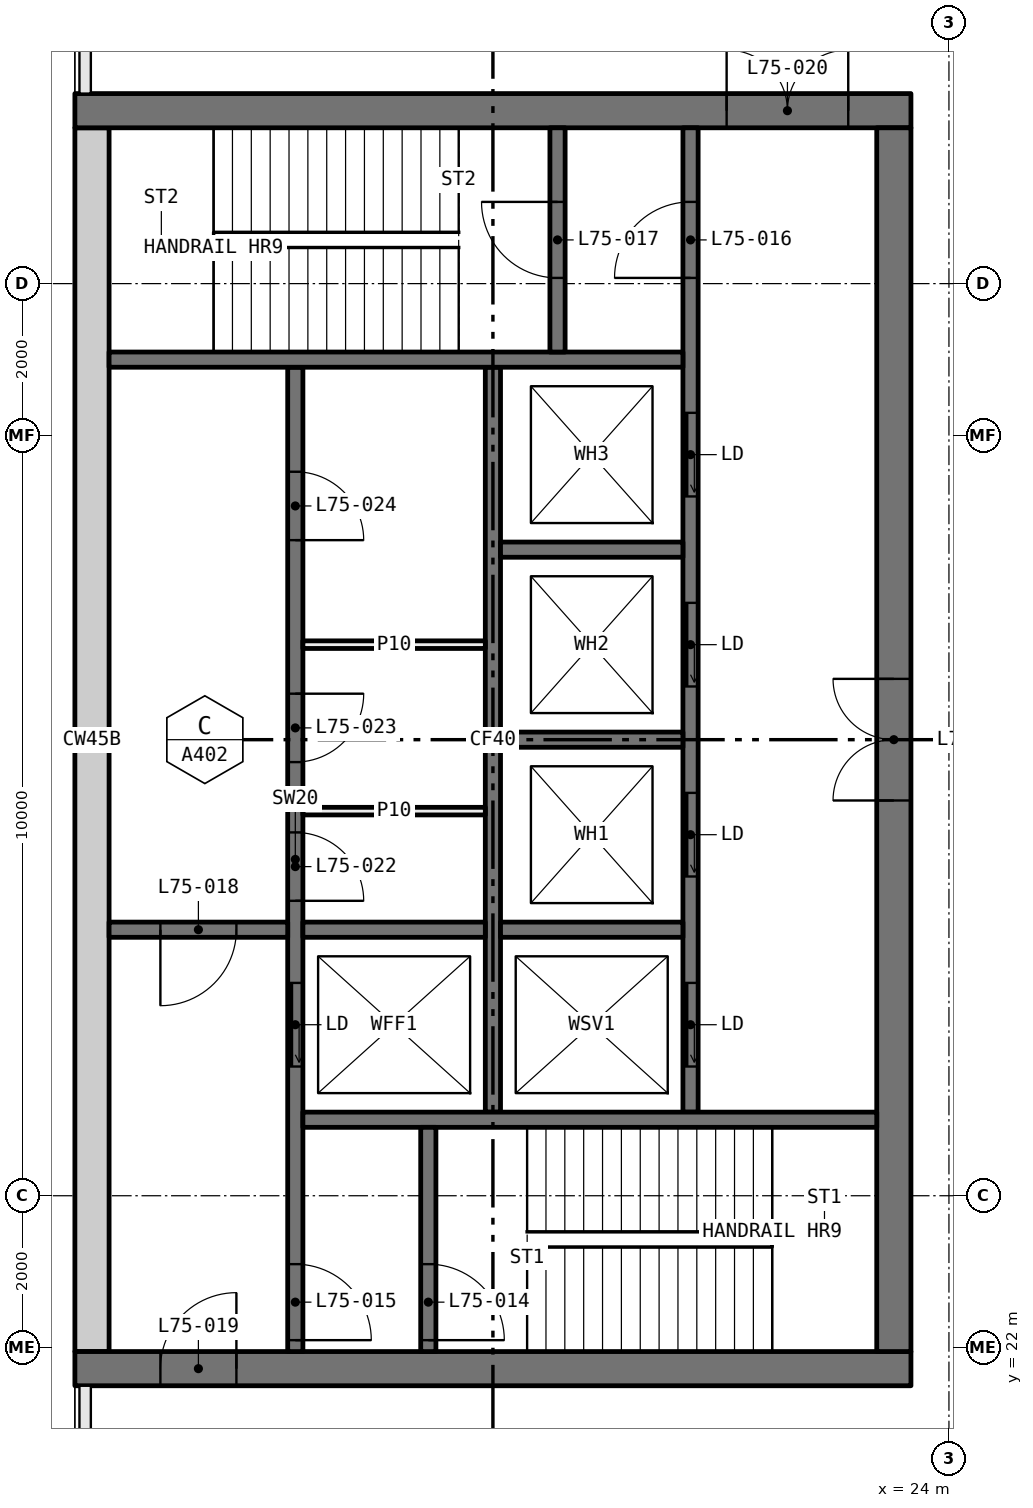
"""IFC4 building model, lengths in metres.
Left out: names, types, materials, properties, quantities, classifications, styles, units other than length and angle.
Written with IfcOpenShell. Run it as: python <this file> out.ifc"""

import sys

from ifc_helpers import new_model, si_unit, direction, frame, frame_2d, origin, place, context, subcontext, project, spatial, rectangle, extrude, element, fill, save


model = new_model("IFC4")
c1 = context("Model", 3, precision=1e-05, world=origin(), true_north=direction((0.0, 1.0)))
c2 = subcontext(c1, "Body", "Model", "MODEL_VIEW")
j1 = project(units=[si_unit("LENGTHUNIT", "METRE"), si_unit("PLANEANGLEUNIT", "RADIAN")], contexts=[c1])
p1 = place(None, origin())
s1 = spatial("IfcSite", under=j1, at=p1, CompositionType="ELEMENT")
p2 = place(p1, origin())
s2 = spatial("IfcBuilding", under=s1, at=p2, CompositionType="ELEMENT")
p3 = place(p2, frame((0.0, 0.0, 277.95)))
s3 = spatial("IfcBuildingStorey", under=s2, at=p3, CompositionType="ELEMENT", Elevation=277.95)
p4 = place(p3, frame((12.5, 21.725, 0.0), z_axis=(0.0, 0.0, 1.0), x_axis=(1.0, 0.0, 0.0)))
e1 = element("IfcWall", 1, at=p4, inside=s3, PredefinedType="SHEAR", context=c2, shape_type="SweptSolid", body=[
    extrude(rectangle(XDim=11.0, YDim=0.45, at=frame_2d((5.5, 0.0))), origin(), (0.0, 0.0, 1.0), 5.0),
])
p5 = place(p4, frame((1.125, 0.0, 0.0)))
e2 = element("IfcOpeningElement", 2, at=p5, cuts=e1, PredefinedType="OPENING", context=c2, shape_type="SweptSolid", body=[
    extrude(rectangle(XDim=1.0, YDim=2.1, at=frame_2d((0.5, 1.05))), frame((0.0, 0.235, 0.0), z_axis=(0.0, -1.0, 0.0), x_axis=(1.0, 0.0, 0.0)), (0.0, 0.0, 1.0), 0.47),
])
p6 = place(p3, frame((12.5, 38.275, 0.0), z_axis=(0.0, 0.0, 1.0), x_axis=(1.0, 0.0, 0.0)))
e3 = element("IfcWall", 3, at=p6, inside=s3, PredefinedType="SHEAR", context=c2, shape_type="SweptSolid", body=[
    extrude(rectangle(XDim=11.0, YDim=0.45, at=frame_2d((5.5, 0.0))), origin(), (0.0, 0.0, 1.0), 5.0),
])
p7 = place(p6, frame((8.575, 0.0, 0.0)))
e4 = element("IfcOpeningElement", 4, at=p7, cuts=e3, PredefinedType="OPENING", context=c2, shape_type="SweptSolid", body=[
    extrude(rectangle(XDim=1.6, YDim=2.1, at=frame_2d((0.8, 1.05))), frame((0.0, 0.235, 0.0), z_axis=(0.0, -1.0, 0.0), x_axis=(1.0, 0.0, 0.0)), (0.0, 0.0, 1.0), 0.47),
])
p8 = place(p3, frame((12.725, 21.95, 0.0), z_axis=(0.0, 0.0, 1.0), x_axis=(0.0, 1.0, 0.0)))
e5 = element("IfcWall", 5, at=p8, inside=s3, PredefinedType="SHEAR", context=c2, shape_type="SweptSolid", body=[
    extrude(rectangle(XDim=16.1, YDim=0.45, at=frame_2d((8.05, 0.0))), origin(), (0.0, 0.0, 1.0), 5.0),
])
p9 = place(p3, frame((23.275, 21.95, 0.0), z_axis=(0.0, 0.0, 1.0), x_axis=(0.0, 1.0, 0.0)))
e6 = element("IfcWall", 6, at=p9, inside=s3, PredefinedType="SHEAR", context=c2, shape_type="SweptSolid", body=[
    extrude(rectangle(XDim=16.1, YDim=0.45, at=frame_2d((8.05, 0.0))), origin(), (0.0, 0.0, 1.0), 5.0),
])
p10 = place(p9, frame((7.25, 0.0, 0.0)))
e7 = element("IfcOpeningElement", 7, at=p10, cuts=e6, PredefinedType="OPENING", context=c2, shape_type="SweptSolid", body=[
    extrude(rectangle(XDim=1.6, YDim=2.1, at=frame_2d((0.8, 1.05))), frame((0.0, 0.235, 0.0), z_axis=(0.0, -1.0, 0.0), x_axis=(1.0, 0.0, 0.0)), (0.0, 0.0, 1.0), 0.47),
])
p11 = place(p3, frame((15.4, 21.95, 0.0), z_axis=(0.0, 0.0, 1.0), x_axis=(0.0, 1.0, 0.0)))
e8 = element("IfcWall", 8, at=p11, inside=s3, PredefinedType="SOLIDWALL", context=c2, shape_type="SweptSolid", body=[
    extrude(rectangle(XDim=12.95, YDim=0.2, at=frame_2d((6.475, 0.0))), origin(), (0.0, 0.0, 1.0), 5.0),
])
p12 = place(p11, frame((3.75, 0.0, 0.0)))
e9 = element("IfcOpeningElement", 9, at=p12, cuts=e8, PredefinedType="OPENING", context=c2, shape_type="SweptSolid", body=[
    extrude(rectangle(XDim=1.1, YDim=2.1, at=frame_2d((0.55, 1.05))), frame((0.0, 0.11, 0.0), z_axis=(0.0, -1.0, 0.0), x_axis=(1.0, 0.0, 0.0)), (0.0, 0.0, 1.0), 0.22),
])
p13 = place(p11, frame((0.15, 0.0, 0.0)))
e10 = element("IfcOpeningElement", 10, at=p13, cuts=e8, PredefinedType="OPENING", context=c2, shape_type="SweptSolid", body=[
    extrude(rectangle(XDim=1.0, YDim=2.1, at=frame_2d((0.5, 1.05))), frame((0.0, 0.11, 0.0), z_axis=(0.0, -1.0, 0.0), x_axis=(1.0, 0.0, 0.0)), (0.0, 0.0, 1.0), 0.22),
])
p14 = place(p11, frame((5.93, 0.0, 0.0)))
e11 = element("IfcOpeningElement", 11, at=p14, cuts=e8, PredefinedType="OPENING", context=c2, shape_type="SweptSolid", body=[
    extrude(rectangle(XDim=0.9, YDim=2.1, at=frame_2d((0.45, 1.05))), frame((0.0, 0.11, 0.0), z_axis=(0.0, -1.0, 0.0), x_axis=(1.0, 0.0, 0.0)), (0.0, 0.0, 1.0), 0.22),
])
p15 = place(p11, frame((7.755, 0.0, 0.0)))
e12 = element("IfcOpeningElement", 12, at=p15, cuts=e8, PredefinedType="OPENING", context=c2, shape_type="SweptSolid", body=[
    extrude(rectangle(XDim=0.9, YDim=2.1, at=frame_2d((0.45, 1.05))), frame((0.0, 0.11, 0.0), z_axis=(0.0, -1.0, 0.0), x_axis=(1.0, 0.0, 0.0)), (0.0, 0.0, 1.0), 0.22),
])
p16 = place(p11, frame((10.675, 0.0, 0.0)))
e13 = element("IfcOpeningElement", 13, at=p16, cuts=e8, PredefinedType="OPENING", context=c2, shape_type="SweptSolid", body=[
    extrude(rectangle(XDim=0.9, YDim=2.1, at=frame_2d((0.45, 1.05))), frame((0.0, 0.11, 0.0), z_axis=(0.0, -1.0, 0.0), x_axis=(1.0, 0.0, 0.0)), (0.0, 0.0, 1.0), 0.22),
])
p17 = place(p3, frame((20.6, 25.1, 0.0), z_axis=(0.0, 0.0, 1.0), x_axis=(0.0, 1.0, 0.0)))
e14 = element("IfcWall", 14, at=p17, inside=s3, PredefinedType="SOLIDWALL", context=c2, shape_type="SweptSolid", body=[
    extrude(rectangle(XDim=12.95, YDim=0.2, at=frame_2d((6.475, 0.0))), origin(), (0.0, 0.0, 1.0), 5.0),
])
p18 = place(p17, frame((0.6, 0.0, 0.0)))
e15 = element("IfcOpeningElement", 15, at=p18, cuts=e14, PredefinedType="OPENING", context=c2, shape_type="SweptSolid", body=[
    extrude(rectangle(XDim=1.1, YDim=2.1, at=frame_2d((0.55, 1.05))), frame((0.0, 0.11, 0.0), z_axis=(0.0, -1.0, 0.0), x_axis=(1.0, 0.0, 0.0)), (0.0, 0.0, 1.0), 0.22),
])
p19 = place(p17, frame((3.1, 0.0, 0.0)))
e16 = element("IfcOpeningElement", 16, at=p19, cuts=e14, PredefinedType="OPENING", context=c2, shape_type="SweptSolid", body=[
    extrude(rectangle(XDim=1.1, YDim=2.1, at=frame_2d((0.55, 1.05))), frame((0.0, 0.11, 0.0), z_axis=(0.0, -1.0, 0.0), x_axis=(1.0, 0.0, 0.0)), (0.0, 0.0, 1.0), 0.22),
])
p20 = place(p17, frame((5.6, 0.0, 0.0)))
e17 = element("IfcOpeningElement", 17, at=p20, cuts=e14, PredefinedType="OPENING", context=c2, shape_type="SweptSolid", body=[
    extrude(rectangle(XDim=1.1, YDim=2.1, at=frame_2d((0.55, 1.05))), frame((0.0, 0.11, 0.0), z_axis=(0.0, -1.0, 0.0), x_axis=(1.0, 0.0, 0.0)), (0.0, 0.0, 1.0), 0.22),
])
p21 = place(p17, frame((8.1, 0.0, 0.0)))
e18 = element("IfcOpeningElement", 18, at=p21, cuts=e14, PredefinedType="OPENING", context=c2, shape_type="SweptSolid", body=[
    extrude(rectangle(XDim=1.1, YDim=2.1, at=frame_2d((0.55, 1.05))), frame((0.0, 0.11, 0.0), z_axis=(0.0, -1.0, 0.0), x_axis=(1.0, 0.0, 0.0)), (0.0, 0.0, 1.0), 0.22),
])
p22 = place(p17, frame((10.975, 0.0, 0.0)))
e19 = element("IfcOpeningElement", 19, at=p22, cuts=e14, PredefinedType="OPENING", context=c2, shape_type="SweptSolid", body=[
    extrude(rectangle(XDim=1.0, YDim=2.1, at=frame_2d((0.5, 1.05))), frame((0.0, 0.11, 0.0), z_axis=(0.0, -1.0, 0.0), x_axis=(1.0, 0.0, 0.0)), (0.0, 0.0, 1.0), 0.22),
])
p23 = place(p3, frame((18.0, 25.1, 0.0), z_axis=(0.0, 0.0, 1.0), x_axis=(0.0, 1.0, 0.0)))
e20 = element("IfcWall", 20, at=p23, inside=s3, PredefinedType="SOLIDWALL", context=c2, shape_type="SweptSolid", body=[
    extrude(rectangle(XDim=9.8, YDim=0.2, at=frame_2d((4.9, 0.0))), origin(), (0.0, 0.0, 1.0), 5.0),
])
for number, where, z_axis, x_axis in (
    (21, (15.5, 25.0, 0.0), (0.0, 0.0, 1.0), (1.0, 0.0, 0.0)),
    (22, (12.95, 35.0, 0.0), (0.0, 0.0, 1.0), (1.0, 0.0, 0.0)),
):
    element("IfcWall", number, at=place(p3, frame(where, z_axis=z_axis, x_axis=x_axis)), inside=s3, PredefinedType="SOLIDWALL", context=c2, shape_type="SweptSolid", body=[
        extrude(rectangle(XDim=7.55, YDim=0.2, at=frame_2d((3.775, 0.0))), origin(), (0.0, 0.0, 1.0), 5.0),
    ])
p24 = place(p3, frame((12.95, 27.5, 0.0), z_axis=(0.0, 0.0, 1.0), x_axis=(1.0, 0.0, 0.0)))
e23 = element("IfcWall", 23, at=p24, inside=s3, PredefinedType="SOLIDWALL", context=c2, shape_type="SweptSolid", body=[
    extrude(rectangle(XDim=2.35, YDim=0.2, at=frame_2d((1.175, 0.0))), origin(), (0.0, 0.0, 1.0), 5.0),
])
p25 = place(p24, frame((0.675, 0.0, 0.0)))
e24 = element("IfcOpeningElement", 24, at=p25, cuts=e23, PredefinedType="OPENING", context=c2, shape_type="SweptSolid", body=[
    extrude(rectangle(XDim=1.0, YDim=2.1, at=frame_2d((0.5, 1.05))), frame((0.0, 0.11, 0.0), z_axis=(0.0, -1.0, 0.0), x_axis=(1.0, 0.0, 0.0)), (0.0, 0.0, 1.0), 0.22),
])
p26 = place(p3, frame((17.15, 21.95, 0.0), z_axis=(0.0, 0.0, 1.0), x_axis=(0.0, 1.0, 0.0)))
e25 = element("IfcWall", 25, at=p26, inside=s3, PredefinedType="SOLIDWALL", context=c2, shape_type="SweptSolid", body=[
    extrude(rectangle(XDim=2.95, YDim=0.2, at=frame_2d((1.475, 0.0))), origin(), (0.0, 0.0, 1.0), 5.0),
])
p27 = place(p26, frame((0.15, 0.0, 0.0)))
e26 = element("IfcOpeningElement", 26, at=p27, cuts=e25, PredefinedType="OPENING", context=c2, shape_type="SweptSolid", body=[
    extrude(rectangle(XDim=1.0, YDim=2.1, at=frame_2d((0.5, 1.05))), frame((0.0, 0.11, 0.0), z_axis=(0.0, -1.0, 0.0), x_axis=(1.0, 0.0, 0.0)), (0.0, 0.0, 1.0), 0.22),
])
p28 = place(p3, frame((18.85, 35.1, 0.0), z_axis=(0.0, 0.0, 1.0), x_axis=(0.0, 1.0, 0.0)))
e27 = element("IfcWall", 27, at=p28, inside=s3, PredefinedType="SOLIDWALL", context=c2, shape_type="SweptSolid", body=[
    extrude(rectangle(XDim=2.95, YDim=0.2, at=frame_2d((1.475, 0.0))), origin(), (0.0, 0.0, 1.0), 5.0),
])
p29 = place(p28, frame((0.975, 0.0, 0.0)))
e28 = element("IfcOpeningElement", 28, at=p29, cuts=e27, PredefinedType="OPENING", context=c2, shape_type="SweptSolid", body=[
    extrude(rectangle(XDim=1.0, YDim=2.1, at=frame_2d((0.5, 1.05))), frame((0.0, 0.11, 0.0), z_axis=(0.0, -1.0, 0.0), x_axis=(1.0, 0.0, 0.0)), (0.0, 0.0, 1.0), 0.22),
])
for number, where, z_axis, x_axis in (
    (29, (15.5, 27.5, 0.0), (0.0, 0.0, 1.0), (1.0, 0.0, 0.0)),
    (30, (18.1, 27.5, 0.0), (0.0, 0.0, 1.0), (1.0, 0.0, 0.0)),
    (31, (18.1, 30.0, 0.0), (0.0, 0.0, 1.0), (1.0, 0.0, 0.0)),
    (32, (18.1, 32.5, 0.0), (0.0, 0.0, 1.0), (1.0, 0.0, 0.0)),
):
    element("IfcWall", number, at=place(p3, frame(where, z_axis=z_axis, x_axis=x_axis)), inside=s3, PredefinedType="SOLIDWALL", context=c2, shape_type="SweptSolid", body=[
        extrude(rectangle(XDim=2.4, YDim=0.2, at=frame_2d((1.2, 0.0))), origin(), (0.0, 0.0, 1.0), 5.0),
    ])
for number, where, z_axis, x_axis in (
    (33, (15.5, 29.06, 0.0), (0.0, 0.0, 1.0), (1.0, 0.0, 0.0)),
    (34, (15.5, 31.25, 0.0), (0.0, 0.0, 1.0), (1.0, 0.0, 0.0)),
):
    element("IfcWall", number, at=place(p3, frame(where, z_axis=z_axis, x_axis=x_axis)), inside=s3, PredefinedType="PARTITIONING", context=c2, shape_type="SweptSolid", body=[
        extrude(rectangle(XDim=2.4, YDim=0.1, at=frame_2d((1.2, 0.0))), origin(), (0.0, 0.0, 1.0), 5.0),
    ])
p30 = place(p18, origin())
e35 = element("IfcDoor", 35, at=p30, inside=s3, OperationType="SLIDING_TO_LEFT", PredefinedType="DOOR", context=c2, shape_type="SweptSolid", body=[
    extrude(rectangle(XDim=1.1, YDim=2.1, at=frame_2d((0.55, 1.05))), frame((0.0, 0.025, 0.0), z_axis=(0.0, -1.0, 0.0), x_axis=(1.0, 0.0, 0.0)), (0.0, 0.0, 1.0), 0.05),
])
fill(e15, e35)
p31 = place(p19, origin())
e36 = element("IfcDoor", 36, at=p31, inside=s3, OperationType="SLIDING_TO_LEFT", PredefinedType="DOOR", context=c2, shape_type="SweptSolid", body=[
    extrude(rectangle(XDim=1.1, YDim=2.1, at=frame_2d((0.55, 1.05))), frame((0.0, 0.025, 0.0), z_axis=(0.0, -1.0, 0.0), x_axis=(1.0, 0.0, 0.0)), (0.0, 0.0, 1.0), 0.05),
])
fill(e16, e36)
p32 = place(p20, origin())
e37 = element("IfcDoor", 37, at=p32, inside=s3, OperationType="SLIDING_TO_LEFT", PredefinedType="DOOR", context=c2, shape_type="SweptSolid", body=[
    extrude(rectangle(XDim=1.1, YDim=2.1, at=frame_2d((0.55, 1.05))), frame((0.0, 0.025, 0.0), z_axis=(0.0, -1.0, 0.0), x_axis=(1.0, 0.0, 0.0)), (0.0, 0.0, 1.0), 0.05),
])
fill(e17, e37)
p33 = place(p21, origin())
e38 = element("IfcDoor", 38, at=p33, inside=s3, OperationType="SLIDING_TO_LEFT", PredefinedType="DOOR", context=c2, shape_type="SweptSolid", body=[
    extrude(rectangle(XDim=1.1, YDim=2.1, at=frame_2d((0.55, 1.05))), frame((0.0, 0.025, 0.0), z_axis=(0.0, -1.0, 0.0), x_axis=(1.0, 0.0, 0.0)), (0.0, 0.0, 1.0), 0.05),
])
fill(e18, e38)
p34 = place(p12, origin())
e39 = element("IfcDoor", 39, at=p34, inside=s3, OperationType="SLIDING_TO_LEFT", PredefinedType="DOOR", context=c2, shape_type="SweptSolid", body=[
    extrude(rectangle(XDim=1.1, YDim=2.1, at=frame_2d((0.55, 1.05))), frame((0.0, 0.025, 0.0), z_axis=(0.0, -1.0, 0.0), x_axis=(1.0, 0.0, 0.0)), (0.0, 0.0, 1.0), 0.05),
])
fill(e9, e39)
p35 = place(p27, frame((1.0, 0.0, 0.0), x_axis=(-1.0, 0.0, 0.0)))
e40 = element("IfcDoor", 40, at=p35, inside=s3, OperationType="SINGLE_SWING_LEFT", PredefinedType="DOOR", context=c2, shape_type="SweptSolid", body=[
    extrude(rectangle(XDim=1.0, YDim=2.1, at=frame_2d((0.5, 1.05))), frame((0.0, 0.025, 0.0), z_axis=(0.0, -1.0, 0.0), x_axis=(1.0, 0.0, 0.0)), (0.0, 0.0, 1.0), 0.05),
])
fill(e26, e40)
p36 = place(p13, frame((1.0, 0.0, 0.0), x_axis=(-1.0, 0.0, 0.0)))
e41 = element("IfcDoor", 41, at=p36, inside=s3, OperationType="SINGLE_SWING_LEFT", PredefinedType="DOOR", context=c2, shape_type="SweptSolid", body=[
    extrude(rectangle(XDim=1.0, YDim=2.1, at=frame_2d((0.5, 1.05))), frame((0.0, 0.025, 0.0), z_axis=(0.0, -1.0, 0.0), x_axis=(1.0, 0.0, 0.0)), (0.0, 0.0, 1.0), 0.05),
])
fill(e10, e41)
p37 = place(p22, origin())
e42 = element("IfcDoor", 42, at=p37, inside=s3, OperationType="SINGLE_SWING_RIGHT", PredefinedType="DOOR", context=c2, shape_type="SweptSolid", body=[
    extrude(rectangle(XDim=1.0, YDim=2.1, at=frame_2d((0.5, 1.05))), frame((0.0, 0.025, 0.0), z_axis=(0.0, -1.0, 0.0), x_axis=(1.0, 0.0, 0.0)), (0.0, 0.0, 1.0), 0.05),
])
fill(e19, e42)
p38 = place(p29, origin())
e43 = element("IfcDoor", 43, at=p38, inside=s3, OperationType="SINGLE_SWING_LEFT", PredefinedType="DOOR", context=c2, shape_type="SweptSolid", body=[
    extrude(rectangle(XDim=1.0, YDim=2.1, at=frame_2d((0.5, 1.05))), frame((0.0, 0.025, 0.0), z_axis=(0.0, -1.0, 0.0), x_axis=(1.0, 0.0, 0.0)), (0.0, 0.0, 1.0), 0.05),
])
fill(e28, e43)
p39 = place(p25, frame((1.0, 0.0, 0.0), x_axis=(-1.0, 0.0, 0.0)))
e44 = element("IfcDoor", 44, at=p39, inside=s3, OperationType="SINGLE_SWING_LEFT", PredefinedType="DOOR", context=c2, shape_type="SweptSolid", body=[
    extrude(rectangle(XDim=1.0, YDim=2.1, at=frame_2d((0.5, 1.05))), frame((0.0, 0.025, 0.0), z_axis=(0.0, -1.0, 0.0), x_axis=(1.0, 0.0, 0.0)), (0.0, 0.0, 1.0), 0.05),
])
fill(e24, e44)
p40 = place(p5, origin())
e45 = element("IfcDoor", 45, at=p40, inside=s3, OperationType="SINGLE_SWING_LEFT", PredefinedType="DOOR", context=c2, shape_type="SweptSolid", body=[
    extrude(rectangle(XDim=1.0, YDim=2.1, at=frame_2d((0.5, 1.05))), frame((0.0, 0.025, 0.0), z_axis=(0.0, -1.0, 0.0), x_axis=(1.0, 0.0, 0.0)), (0.0, 0.0, 1.0), 0.05),
])
fill(e2, e45)
p41 = place(p7, origin())
e46 = element("IfcDoor", 46, at=p41, inside=s3, OperationType="DOUBLE_DOOR_SINGLE_SWING", PredefinedType="DOOR", context=c2, shape_type="SweptSolid", body=[
    extrude(rectangle(XDim=1.6, YDim=2.1, at=frame_2d((0.8, 1.05))), frame((0.0, 0.025, 0.0), z_axis=(0.0, -1.0, 0.0), x_axis=(1.0, 0.0, 0.0)), (0.0, 0.0, 1.0), 0.05),
])
fill(e4, e46)
p42 = place(p10, origin())
e47 = element("IfcDoor", 47, at=p42, inside=s3, OperationType="DOUBLE_DOOR_SINGLE_SWING", PredefinedType="DOOR", context=c2, shape_type="SweptSolid", body=[
    extrude(rectangle(XDim=1.6, YDim=2.1, at=frame_2d((0.8, 1.05))), frame((0.0, 0.025, 0.0), z_axis=(0.0, -1.0, 0.0), x_axis=(1.0, 0.0, 0.0)), (0.0, 0.0, 1.0), 0.05),
])
fill(e7, e47)
p43 = place(p14, frame((0.9, 0.0, 0.0), x_axis=(-1.0, 0.0, 0.0)))
e48 = element("IfcDoor", 48, at=p43, inside=s3, OperationType="SINGLE_SWING_LEFT", PredefinedType="DOOR", context=c2, shape_type="SweptSolid", body=[
    extrude(rectangle(XDim=0.9, YDim=2.1, at=frame_2d((0.45, 1.05))), frame((0.0, 0.025, 0.0), z_axis=(0.0, -1.0, 0.0), x_axis=(1.0, 0.0, 0.0)), (0.0, 0.0, 1.0), 0.05),
])
fill(e11, e48)
p44 = place(p15, frame((0.9, 0.0, 0.0), x_axis=(-1.0, 0.0, 0.0)))
e49 = element("IfcDoor", 49, at=p44, inside=s3, OperationType="SINGLE_SWING_RIGHT", PredefinedType="DOOR", context=c2, shape_type="SweptSolid", body=[
    extrude(rectangle(XDim=0.9, YDim=2.1, at=frame_2d((0.45, 1.05))), frame((0.0, 0.025, 0.0), z_axis=(0.0, -1.0, 0.0), x_axis=(1.0, 0.0, 0.0)), (0.0, 0.0, 1.0), 0.05),
])
fill(e12, e49)
p45 = place(p16, frame((0.9, 0.0, 0.0), x_axis=(-1.0, 0.0, 0.0)))
e50 = element("IfcDoor", 50, at=p45, inside=s3, OperationType="SINGLE_SWING_LEFT", PredefinedType="DOOR", context=c2, shape_type="SweptSolid", body=[
    extrude(rectangle(XDim=0.9, YDim=2.1, at=frame_2d((0.45, 1.05))), frame((0.0, 0.025, 0.0), z_axis=(0.0, -1.0, 0.0), x_axis=(1.0, 0.0, 0.0)), (0.0, 0.0, 1.0), 0.05),
])
fill(e13, e50)
save(model, sys.argv[1])
